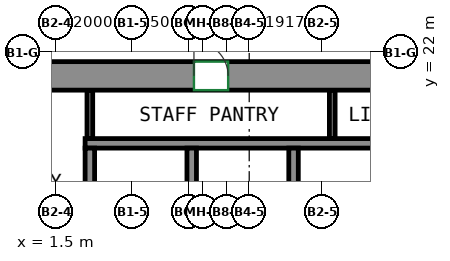
"""IFC4 building model, lengths in metres.
Left out: names, types, materials, properties, quantities, classifications, styles, units other than length and angle.
Written with IfcOpenShell. Run it as: python <this file> out.ifc"""

import sys

from ifc_helpers import new_model, si_unit, direction, frame, frame_2d, origin, place, context, subcontext, project, spatial, rectangle, extrude, source, transform, mapped, element, fill, save


model = new_model("IFC4")
c1 = context("Model", 3, precision=1e-05, world=origin(), true_north=direction((0.0, 1.0)))
c2 = subcontext(c1, "Body", "Model", "MODEL_VIEW")
j1 = project(units=[si_unit("LENGTHUNIT", "METRE"), si_unit("PLANEANGLEUNIT", "RADIAN")], contexts=[c1])
p1 = place(None, origin())
s1 = spatial("IfcSite", under=j1, at=p1, CompositionType="ELEMENT")
p2 = place(p1, origin())
s2 = spatial("IfcBuilding", under=s1, at=p2, CompositionType="ELEMENT")
p3 = place(p2, frame((0.0, 0.0, 185.5)))
s3 = spatial("IfcBuildingStorey", under=s2, at=p3, CompositionType="ELEMENT", Elevation=185.5)
m1 = source(origin(), c2, "Body", "SweptSolid", [
    extrude(rectangle(XDim=33.6, YDim=0.75, at=frame_2d((16.8, 0.0))), origin(), (0.0, 0.0, 1.0), 3.12),
])
p4 = place(p3, frame((-15.75, 21.375, 0.0), z_axis=(0.0, 0.0, 1.0), x_axis=(1.0, 0.0, 0.0)))
e1 = element("IfcWall", 1, at=p4, inside=s3, PredefinedType="SHEAR", context=c2, shape_type="MappedRepresentation", body=[
    mapped(m1, transform((0.0, 0.0, 0.0))),
])
p5 = place(p4, frame((5.858, 0.0, 0.0)))
e2 = element("IfcOpeningElement", 2, at=p5, cuts=e1, PredefinedType="OPENING", context=c2, shape_type="SweptSolid", body=[
    extrude(rectangle(XDim=0.9, YDim=2.1, at=frame_2d((0.45, 1.05))), frame((0.0, 0.385, 0.0), z_axis=(0.0, -1.0, 0.0), x_axis=(1.0, 0.0, 0.0)), (0.0, 0.0, 1.0), 0.77),
])
p6 = place(p4, frame((10.923, 0.0, 0.0)))
e3 = element("IfcOpeningElement", 3, at=p6, cuts=e1, PredefinedType="OPENING", context=c2, shape_type="SweptSolid", body=[
    extrude(rectangle(XDim=0.9, YDim=2.1, at=frame_2d((0.45, 1.05))), frame((0.0, 0.385, 0.0), z_axis=(0.0, -1.0, 0.0), x_axis=(1.0, 0.0, 0.0)), (0.0, 0.0, 1.0), 0.77),
])
p7 = place(p4, frame((16.055, 0.0, 0.0)))
e4 = element("IfcOpeningElement", 4, at=p7, cuts=e1, PredefinedType="OPENING", context=c2, shape_type="SweptSolid", body=[
    extrude(rectangle(XDim=0.9, YDim=2.1, at=frame_2d((0.45, 1.05))), frame((0.0, 0.385, 0.0), z_axis=(0.0, -1.0, 0.0), x_axis=(1.0, 0.0, 0.0)), (0.0, 0.0, 1.0), 0.77),
])
p8 = place(p4, frame((20.879, 0.0, 0.0)))
e5 = element("IfcOpeningElement", 5, at=p8, cuts=e1, PredefinedType="OPENING", context=c2, shape_type="SweptSolid", body=[
    extrude(rectangle(XDim=0.9, YDim=2.1, at=frame_2d((0.45, 1.05))), frame((0.0, 0.385, 0.0), z_axis=(0.0, -1.0, 0.0), x_axis=(1.0, 0.0, 0.0)), (0.0, 0.0, 1.0), 0.77),
])
p9 = place(p4, frame((26.239, 0.0, 0.0)))
e6 = element("IfcOpeningElement", 6, at=p9, cuts=e1, PredefinedType="OPENING", context=c2, shape_type="SweptSolid", body=[
    extrude(rectangle(XDim=0.9, YDim=2.1, at=frame_2d((0.45, 1.05))), frame((0.0, 0.385, 0.0), z_axis=(0.0, -1.0, 0.0), x_axis=(1.0, 0.0, 0.0)), (0.0, 0.0, 1.0), 0.77),
])
p10 = place(p4, frame((2.275, 0.0, 0.0)))
e7 = element("IfcOpeningElement", 7, at=p10, cuts=e1, PredefinedType="OPENING", context=c2, shape_type="SweptSolid", body=[
    extrude(rectangle(XDim=0.9, YDim=2.1, at=frame_2d((0.45, 1.05))), frame((0.0, 0.385, 0.0), z_axis=(0.0, -1.0, 0.0), x_axis=(1.0, 0.0, 0.0)), (0.0, 0.0, 1.0), 0.77),
])
p11 = place(p4, frame((30.425, 0.0, 0.0)))
e8 = element("IfcOpeningElement", 8, at=p11, cuts=e1, PredefinedType="OPENING", context=c2, shape_type="SweptSolid", body=[
    extrude(rectangle(XDim=0.9, YDim=2.1, at=frame_2d((0.45, 1.05))), frame((0.0, 0.385, 0.0), z_axis=(0.0, -1.0, 0.0), x_axis=(1.0, 0.0, 0.0)), (0.0, 0.0, 1.0), 0.77),
])
m2 = source(origin(), c2, "Body", "SweptSolid", [
    extrude(rectangle(XDim=10.97, YDim=0.25, at=frame_2d((5.485, 0.0))), origin(), (0.0, 0.0, 1.0), 3.12),
])
p12 = place(p3, frame((2.265, 19.6, 0.0), z_axis=(0.0, 0.0, 1.0), x_axis=(1.0, 0.0, 0.0)))
e9 = element("IfcWall", 9, at=p12, inside=s3, PredefinedType="PARTITIONING", context=c2, shape_type="MappedRepresentation", body=[
    mapped(m2, transform((0.0, 0.0, 0.0))),
])
m3 = source(origin(), c2, "Body", "SweptSolid", [
    extrude(rectangle(XDim=3.275, YDim=0.25, at=frame_2d((1.638, 0.0))), origin(), (0.0, 0.0, 1.0), 3.12),
])
for number, where, z_axis, x_axis in (
    (10, (2.39, 16.2, 0.0), (0.0, 0.0, 1.0), (0.0, 1.0, 0.0)),
    (11, (5.07, 16.2, 0.0), (0.0, 0.0, 1.0), (0.0, 1.0, 0.0)),
    (12, (7.75, 16.2, 0.0), (0.0, 0.0, 1.0), (0.0, 1.0, 0.0)),
):
    element("IfcWall", number, at=place(p3, frame(where, z_axis=z_axis, x_axis=x_axis)), inside=s3, PredefinedType="PARTITIONING", context=c2, shape_type="MappedRepresentation", body=[
        mapped(m3, transform((0.0, 0.0, 0.0))),
    ])
m4 = source(origin(), c2, "Body", "SweptSolid", [
    extrude(rectangle(XDim=1.275, YDim=0.15, at=frame_2d((0.637, 0.0))), origin(), (0.0, 0.0, 1.0), 3.12),
])
for number, where, z_axis, x_axis in (
    (13, (2.39, 19.725, 0.0), (0.0, 0.0, 1.0), (0.0, 1.0, 0.0)),
    (14, (8.768, 19.725, 0.0), (0.0, 0.0, 1.0), (0.0, 1.0, 0.0)),
):
    element("IfcWall", number, at=place(p3, frame(where, z_axis=z_axis, x_axis=x_axis)), inside=s3, PredefinedType="PARTITIONING", context=c2, shape_type="MappedRepresentation", body=[
        mapped(m4, transform((0.0, 0.0, 0.0))),
    ])
p13 = place(p8, origin())
e15 = element("IfcDoor", 15, at=p13, inside=s3, OperationType="SINGLE_SWING_LEFT", PredefinedType="DOOR", context=c2, shape_type="SweptSolid", body=[
    extrude(rectangle(XDim=0.9, YDim=2.1, at=frame_2d((0.45, 1.05))), frame((0.0, -0.23, 0.0), z_axis=(0.0, -1.0, 0.0), x_axis=(1.0, 0.0, 0.0)), (0.0, 0.0, 1.0), 0.05),
])
fill(e5, e15)
save(model, sys.argv[1])
